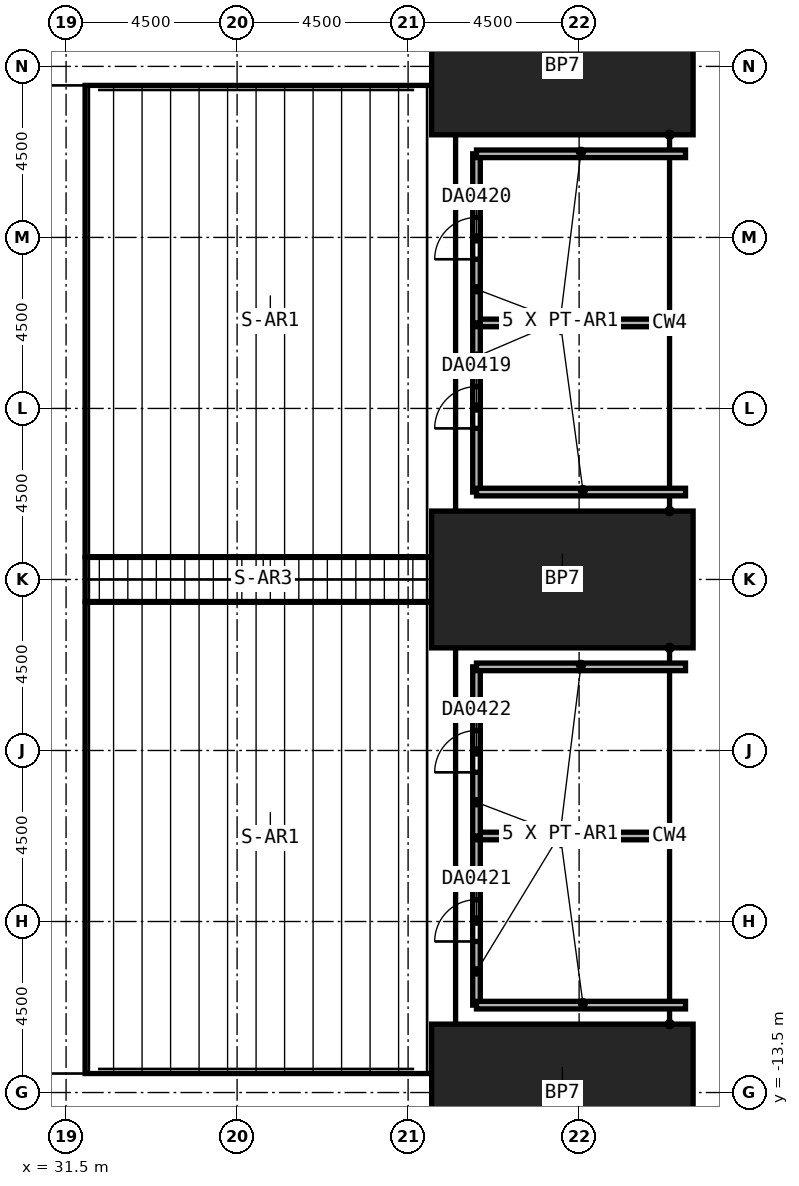
"""IFC4 building model, lengths in metres.
Left out: names, types, materials, properties, quantities, classifications, styles, units other than length and angle.
Written with IfcOpenShell. Run it as: python <this file> out.ifc"""

import sys

from ifc_helpers import new_model, si_unit, direction, frame, frame_2d, origin, origin_2d, place, context, subcontext, project, spatial, rectangle, extrude, element, fill, save


model = new_model("IFC4")
c1 = context("Model", 3, precision=1e-05, world=origin(), true_north=direction((0.0, 1.0)))
c2 = subcontext(c1, "Body", "Model", "MODEL_VIEW")
j1 = project(units=[si_unit("LENGTHUNIT", "METRE"), si_unit("PLANEANGLEUNIT", "RADIAN")], contexts=[c1])
p1 = place(None, origin())
s1 = spatial("IfcSite", under=j1, at=p1, CompositionType="ELEMENT")
p2 = place(p1, origin())
s2 = spatial("IfcBuilding", under=s1, at=p2, CompositionType="ELEMENT")
p3 = place(p2, frame((0.0, 0.0, 31.0)))
s3 = spatial("IfcBuildingStorey", under=s2, at=p3, CompositionType="ELEMENT", Elevation=31.0)
for number, where, z_axis, x_axis in (
    (1, (44.56, -13.5, 0.0), (0.0, 0.0, 1.0), (0.0, 1.0, 0.0)),
    (2, (44.56, 0.0, 0.0), (0.0, 0.0, 1.0), (0.0, 1.0, 0.0)),
    (3, (44.56, 13.5, 0.0), (0.0, 0.0, 1.0), (0.0, 1.0, 0.0)),
):
    element("IfcColumn", number, at=place(p3, frame(where, z_axis=z_axis, x_axis=x_axis)), inside=s3, PredefinedType="COLUMN", context=c2, shape_type="SweptSolid", body=[
        extrude(rectangle(XDim=3.6, YDim=6.88, at=origin_2d()), origin(), (0.0, 0.0, 1.0), 6.0),
    ])
p4 = place(p3, frame((42.3, 2.3, 0.0), z_axis=(0.0, 0.0, 1.0), x_axis=(0.0, 1.0, 0.0)))
e4 = element("IfcWall", 4, at=p4, inside=s3, PredefinedType="PARTITIONING", context=c2, shape_type="SweptSolid", body=[
    extrude(rectangle(XDim=4.45, YDim=0.2, at=frame_2d((2.225, 0.0))), origin(), (0.0, 0.0, 1.0), 5.7),
])
p5 = place(p4, frame((1.675, 0.0, 0.0)))
e5 = element("IfcOpeningElement", 5, at=p5, cuts=e4, PredefinedType="OPENING", context=c2, shape_type="SweptSolid", body=[
    extrude(rectangle(XDim=1.1, YDim=2.4, at=frame_2d((0.55, 1.2))), frame((0.0, 0.1, 0.0), z_axis=(0.0, -1.0, 0.0), x_axis=(1.0, 0.0, 0.0)), (0.0, 0.0, 1.0), 0.2),
])
for number, where, z_axis, x_axis in (
    (6, (42.3, 2.3, 0.0), (0.0, 0.0, 1.0), (1.0, 0.0, 0.0)),
    (7, (42.3, 6.75, 0.0), (0.0, 0.0, 1.0), (1.0, 0.0, 0.0)),
):
    element("IfcWall", number, at=place(p3, frame(where, z_axis=z_axis, x_axis=x_axis)), inside=s3, PredefinedType="PARTITIONING", context=c2, shape_type="SweptSolid", body=[
        extrude(rectangle(XDim=5.5, YDim=0.2, at=frame_2d((2.75, 0.0))), origin(), (0.0, 0.0, 1.0), 5.7),
    ])
p6 = place(p3, frame((42.3, 6.75, 0.0), z_axis=(0.0, 0.0, 1.0), x_axis=(0.0, 1.0, 0.0)))
e8 = element("IfcWall", 8, at=p6, inside=s3, PredefinedType="PARTITIONING", context=c2, shape_type="SweptSolid", body=[
    extrude(rectangle(XDim=4.45, YDim=0.2, at=frame_2d((2.225, 0.0))), origin(), (0.0, 0.0, 1.0), 5.7),
])
p7 = place(p6, frame((1.675, 0.0, 0.0)))
e9 = element("IfcOpeningElement", 9, at=p7, cuts=e8, PredefinedType="OPENING", context=c2, shape_type="SweptSolid", body=[
    extrude(rectangle(XDim=1.1, YDim=2.4, at=frame_2d((0.55, 1.2))), frame((0.0, 0.1, 0.0), z_axis=(0.0, -1.0, 0.0), x_axis=(1.0, 0.0, 0.0)), (0.0, 0.0, 1.0), 0.2),
])
p8 = place(p3, frame((42.3, 11.2, 0.0), z_axis=(0.0, 0.0, 1.0), x_axis=(1.0, 0.0, 0.0)))
e10 = element("IfcWall", 10, at=p8, inside=s3, PredefinedType="PARTITIONING", context=c2, shape_type="SweptSolid", body=[
    extrude(rectangle(XDim=5.5, YDim=0.2, at=frame_2d((2.75, 0.0))), origin(), (0.0, 0.0, 1.0), 5.7),
])
p9 = place(p3, frame((42.3, -11.2, 0.0), z_axis=(0.0, 0.0, 1.0), x_axis=(0.0, 1.0, 0.0)))
e11 = element("IfcWall", 11, at=p9, inside=s3, PredefinedType="PARTITIONING", context=c2, shape_type="SweptSolid", body=[
    extrude(rectangle(XDim=4.45, YDim=0.2, at=frame_2d((2.225, 0.0))), origin(), (0.0, 0.0, 1.0), 5.7),
])
p10 = place(p9, frame((1.675, 0.0, 0.0)))
e12 = element("IfcOpeningElement", 12, at=p10, cuts=e11, PredefinedType="OPENING", context=c2, shape_type="SweptSolid", body=[
    extrude(rectangle(XDim=1.1, YDim=2.4, at=frame_2d((0.55, 1.2))), frame((0.0, 0.1, 0.0), z_axis=(0.0, -1.0, 0.0), x_axis=(1.0, 0.0, 0.0)), (0.0, 0.0, 1.0), 0.2),
])
for number, where, z_axis, x_axis in (
    (13, (42.3, -11.2, 0.0), (0.0, 0.0, 1.0), (1.0, 0.0, 0.0)),
    (14, (42.3, -6.75, 0.0), (0.0, 0.0, 1.0), (1.0, 0.0, 0.0)),
):
    element("IfcWall", number, at=place(p3, frame(where, z_axis=z_axis, x_axis=x_axis)), inside=s3, PredefinedType="PARTITIONING", context=c2, shape_type="SweptSolid", body=[
        extrude(rectangle(XDim=5.5, YDim=0.2, at=frame_2d((2.75, 0.0))), origin(), (0.0, 0.0, 1.0), 5.7),
    ])
p11 = place(p3, frame((42.3, -6.75, 0.0), z_axis=(0.0, 0.0, 1.0), x_axis=(0.0, 1.0, 0.0)))
e15 = element("IfcWall", 15, at=p11, inside=s3, PredefinedType="PARTITIONING", context=c2, shape_type="SweptSolid", body=[
    extrude(rectangle(XDim=4.45, YDim=0.2, at=frame_2d((2.225, 0.0))), origin(), (0.0, 0.0, 1.0), 5.7),
])
p12 = place(p11, frame((1.675, 0.0, 0.0)))
e16 = element("IfcOpeningElement", 16, at=p12, cuts=e15, PredefinedType="OPENING", context=c2, shape_type="SweptSolid", body=[
    extrude(rectangle(XDim=1.1, YDim=2.4, at=frame_2d((0.55, 1.2))), frame((0.0, 0.1, 0.0), z_axis=(0.0, -1.0, 0.0), x_axis=(1.0, 0.0, 0.0)), (0.0, 0.0, 1.0), 0.2),
])
p13 = place(p3, frame((42.3, -2.3, 0.0), z_axis=(0.0, 0.0, 1.0), x_axis=(1.0, 0.0, 0.0)))
e17 = element("IfcWall", 17, at=p13, inside=s3, PredefinedType="PARTITIONING", context=c2, shape_type="SweptSolid", body=[
    extrude(rectangle(XDim=5.5, YDim=0.2, at=frame_2d((2.75, 0.0))), origin(), (0.0, 0.0, 1.0), 5.7),
])
p14 = place(p5, origin())
e18 = element("IfcDoor", 18, at=p14, inside=s3, OperationType="DOUBLE_DOOR_SINGLE_SWING", PredefinedType="DOOR", context=c2, shape_type="SweptSolid", body=[
    extrude(rectangle(XDim=1.1, YDim=2.4, at=frame_2d((0.55, 1.2))), frame((0.0, 0.025, 0.0), z_axis=(0.0, -1.0, 0.0), x_axis=(1.0, 0.0, 0.0)), (0.0, 0.0, 1.0), 0.05),
])
fill(e5, e18)
p15 = place(p7, origin())
e19 = element("IfcDoor", 19, at=p15, inside=s3, OperationType="DOUBLE_DOOR_SINGLE_SWING", PredefinedType="DOOR", context=c2, shape_type="SweptSolid", body=[
    extrude(rectangle(XDim=1.1, YDim=2.4, at=frame_2d((0.55, 1.2))), frame((0.0, 0.025, 0.0), z_axis=(0.0, -1.0, 0.0), x_axis=(1.0, 0.0, 0.0)), (0.0, 0.0, 1.0), 0.05),
])
fill(e9, e19)
p16 = place(p10, origin())
e20 = element("IfcDoor", 20, at=p16, inside=s3, OperationType="DOUBLE_DOOR_SINGLE_SWING", PredefinedType="DOOR", context=c2, shape_type="SweptSolid", body=[
    extrude(rectangle(XDim=1.1, YDim=2.4, at=frame_2d((0.55, 1.2))), frame((0.0, 0.025, 0.0), z_axis=(0.0, -1.0, 0.0), x_axis=(1.0, 0.0, 0.0)), (0.0, 0.0, 1.0), 0.05),
])
fill(e12, e20)
p17 = place(p12, origin())
e21 = element("IfcDoor", 21, at=p17, inside=s3, OperationType="DOUBLE_DOOR_SINGLE_SWING", PredefinedType="DOOR", context=c2, shape_type="SweptSolid", body=[
    extrude(rectangle(XDim=1.1, YDim=2.4, at=frame_2d((0.55, 1.2))), frame((0.0, 0.025, 0.0), z_axis=(0.0, -1.0, 0.0), x_axis=(1.0, 0.0, 0.0)), (0.0, 0.0, 1.0), 0.05),
])
fill(e16, e21)
save(model, sys.argv[1])
